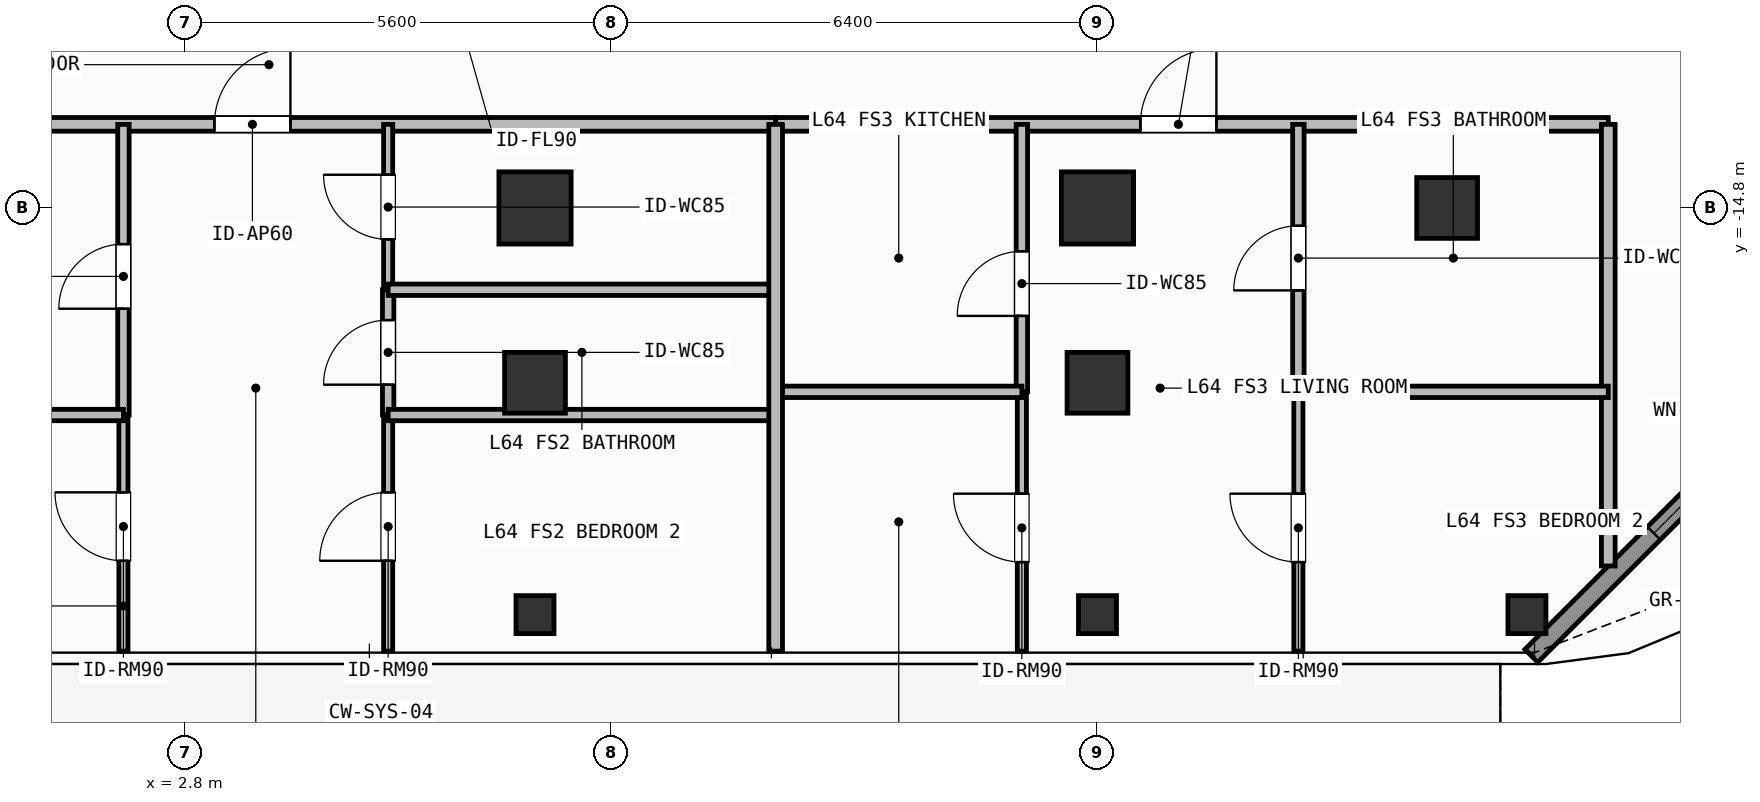
"""IFC4 building model, lengths in metres.
Left out: names, types, materials, properties, quantities, classifications, styles, units other than length and angle.
Written with IfcOpenShell. Run it as: python <this file> out.ifc"""

import sys

from ifc_helpers import new_model, si_unit, direction, frame, frame_2d, origin, origin_2d, place, context, subcontext, project, spatial, rectangle, hollow_rectangle, extrude, element, fill, save


model = new_model("IFC4")
c1 = context("Model", 3, precision=1e-05, world=origin(), true_north=direction((0.0, 1.0)))
c2 = subcontext(c1, "Body", "Model", "MODEL_VIEW")
j1 = project(units=[si_unit("LENGTHUNIT", "METRE"), si_unit("PLANEANGLEUNIT", "RADIAN")], contexts=[c1])
p1 = place(None, origin())
s1 = spatial("IfcSite", under=j1, at=p1, CompositionType="ELEMENT")
p2 = place(p1, origin())
s2 = spatial("IfcBuilding", under=s1, at=p2, CompositionType="ELEMENT")
p3 = place(p2, frame((0.0, 0.0, 262.5)))
s3 = spatial("IfcBuildingStorey", under=s2, at=p3, CompositionType="ELEMENT", Elevation=262.5)
for number, where, z_axis, x_axis in (
    (1, (7.4, -14.8, 0.0), (0.0, 0.0, 1.0), (1.0, 0.0, 0.0)),
    (2, (14.8, -14.8, 0.0), (0.0, 0.0, 1.0), (1.0, 0.0, 0.0)),
):
    element("IfcColumn", number, at=place(p3, frame(where, z_axis=z_axis, x_axis=x_axis)), inside=s3, PredefinedType="COLUMN", context=c2, shape_type="SweptSolid", body=[
        extrude(rectangle(XDim=0.95, YDim=0.95, at=origin_2d()), origin(), (0.0, 0.0, 1.0), 3.9),
    ])
for number, where, z_axis, x_axis in (
    (3, (19.4, -14.8, 0.0), (0.0, 0.0, 1.0), (1.0, 0.0, 0.0)),
    (4, (7.4, -17.1, 0.0), (0.0, 0.0, 1.0), (1.0, 0.0, 0.0)),
    (5, (14.8, -17.1, 0.0), (0.0, 0.0, 1.0), (1.0, 0.0, 0.0)),
):
    element("IfcColumn", number, at=place(p3, frame(where, z_axis=z_axis, x_axis=x_axis)), inside=s3, PredefinedType="COLUMN", context=c2, shape_type="SweptSolid", body=[
        extrude(hollow_rectangle(XDim=0.8, YDim=0.8, WallThickness=0.036, at=origin_2d()), origin(), (0.0, 0.0, 1.0), 3.9),
    ])
for number, where, z_axis, x_axis in (
    (6, (20.45, -20.15, 0.0), (0.0, 0.0, 1.0), (1.0, 0.0, 0.0)),
    (7, (7.4, -20.15, 0.0), (0.0, 0.0, 1.0), (1.0, 0.0, 0.0)),
    (8, (14.8, -20.15, 0.0), (0.0, 0.0, 1.0), (1.0, 0.0, 0.0)),
):
    element("IfcColumn", number, at=place(p3, frame(where, z_axis=z_axis, x_axis=x_axis)), inside=s3, PredefinedType="COLUMN", context=c2, shape_type="SweptSolid", body=[
        extrude(hollow_rectangle(XDim=0.5, YDim=0.5, WallThickness=0.025, at=origin_2d()), origin(), (0.0, 0.0, 1.0), 3.9),
    ])
p4 = place(p3, frame((24.792, -16.408, 0.0), z_axis=(0.0, 0.0, 1.0), x_axis=(-0.707126925818, -0.707086635981, 0.0)))
e9 = element("IfcWall", 9, at=p4, inside=s3, PredefinedType="SOLIDWALL", context=c2, shape_type="SweptSolid", body=[
    extrude(rectangle(XDim=6.06, YDim=0.24, at=frame_2d((3.03, 0.0))), origin(), (0.0, 0.0, 1.0), 3.68),
])
p5 = place(p4, frame((2.28, 0.0, 0.8)))
e10 = element("IfcOpeningElement", 10, at=p5, cuts=e9, PredefinedType="OPENING", context=c2, shape_type="SweptSolid", body=[
    extrude(rectangle(XDim=1.5, YDim=1.85, at=frame_2d((0.75, 0.925))), frame((0.0, 0.13, 0.0), z_axis=(0.0, -1.0, 0.0), x_axis=(1.0, 0.0, 0.0)), (0.0, 0.0, 1.0), 0.26),
])
p6 = place(p3, frame((-3.735, -13.7, 0.0), z_axis=(0.0, 0.0, 1.0), x_axis=(1.0, 0.0, 0.0)))
e11 = element("IfcWall", 11, at=p6, inside=s3, PredefinedType="PARTITIONING", context=c2, shape_type="SweptSolid", body=[
    extrude(rectangle(XDim=14.301, YDim=0.18, at=frame_2d((7.15, 0.0))), origin(), (0.0, 0.0, 1.0), 3.68),
])
p7 = place(p6, frame((6.917, 0.0, 0.0)))
e12 = element("IfcOpeningElement", 12, at=p7, cuts=e11, PredefinedType="OPENING", context=c2, shape_type="SweptSolid", body=[
    extrude(rectangle(XDim=1.0, YDim=2.2, at=frame_2d((0.5, 1.1))), frame((0.0, 0.1, 0.0), z_axis=(0.0, -1.0, 0.0), x_axis=(1.0, 0.0, 0.0)), (0.0, 0.0, 1.0), 0.2),
])
p8 = place(p3, frame((1.985, -17.524, 0.0), z_axis=(0.0, 0.0, 1.0), x_axis=(0.0, 1.0, 0.0)))
e13 = element("IfcWall", 13, at=p8, inside=s3, PredefinedType="PARTITIONING", context=c2, shape_type="SweptSolid", body=[
    extrude(rectangle(XDim=3.824, YDim=0.15, at=frame_2d((1.912, 0.0))), origin(), (0.0, 0.0, 1.0), 3.68),
])
p9 = place(p8, frame((1.398, 0.0, 0.0)))
e14 = element("IfcOpeningElement", 14, at=p9, cuts=e13, PredefinedType="OPENING", context=c2, shape_type="SweptSolid", body=[
    extrude(rectangle(XDim=0.85, YDim=2.1, at=frame_2d((0.425, 1.05))), frame((0.0, 0.085, 0.0), z_axis=(0.0, -1.0, 0.0), x_axis=(1.0, 0.0, 0.0)), (0.0, 0.0, 1.0), 0.17),
])
p10 = place(p3, frame((1.985, -20.63, 0.0), z_axis=(0.0, 0.0, 1.0), x_axis=(0.0, 1.0, 0.0)))
e15 = element("IfcWall", 15, at=p10, inside=s3, PredefinedType="PARTITIONING", context=c2, shape_type="SweptSolid", body=[
    extrude(rectangle(XDim=3.106, YDim=0.12, at=frame_2d((1.553, 0.0))), origin(), (0.0, 0.0, 1.0), 3.68),
])
p11 = place(p10, frame((1.189, 0.0, 0.0)))
e16 = element("IfcOpeningElement", 16, at=p11, cuts=e15, PredefinedType="OPENING", context=c2, shape_type="SweptSolid", body=[
    extrude(rectangle(XDim=0.9, YDim=2.1, at=frame_2d((0.45, 1.05))), frame((0.0, 0.07, 0.0), z_axis=(0.0, -1.0, 0.0), x_axis=(1.0, 0.0, 0.0)), (0.0, 0.0, 1.0), 0.14),
])
p12 = place(p3, frame((5.468, -17.524, 0.0), z_axis=(0.0, 0.0, 1.0), x_axis=(0.0, 1.0, 0.0)))
e17 = element("IfcWall", 17, at=p12, inside=s3, PredefinedType="PARTITIONING", context=c2, shape_type="SweptSolid", body=[
    extrude(rectangle(XDim=1.648, YDim=0.15, at=frame_2d((0.824, 0.0))), origin(), (0.0, 0.0, 1.0), 3.68),
])
p13 = place(p12, frame((0.399, 0.0, 0.0)))
e18 = element("IfcOpeningElement", 18, at=p13, cuts=e17, PredefinedType="OPENING", context=c2, shape_type="SweptSolid", body=[
    extrude(rectangle(XDim=0.85, YDim=2.1, at=frame_2d((0.425, 1.05))), frame((0.0, 0.085, 0.0), z_axis=(0.0, -1.0, 0.0), x_axis=(1.0, 0.0, 0.0)), (0.0, 0.0, 1.0), 0.17),
])
p14 = place(p3, frame((5.468, -15.876, 0.0), z_axis=(0.0, 0.0, 1.0), x_axis=(0.0, 1.0, 0.0)))
e19 = element("IfcWall", 19, at=p14, inside=s3, PredefinedType="PARTITIONING", context=c2, shape_type="SweptSolid", body=[
    extrude(rectangle(XDim=2.176, YDim=0.12, at=frame_2d((1.088, 0.0))), origin(), (0.0, 0.0, 1.0), 3.68),
])
p15 = place(p14, frame((0.663, 0.0, 0.0)))
e20 = element("IfcOpeningElement", 20, at=p15, cuts=e19, PredefinedType="OPENING", context=c2, shape_type="SweptSolid", body=[
    extrude(rectangle(XDim=0.85, YDim=2.1, at=frame_2d((0.425, 1.05))), frame((0.0, 0.07, 0.0), z_axis=(0.0, -1.0, 0.0), x_axis=(1.0, 0.0, 0.0)), (0.0, 0.0, 1.0), 0.14),
])
p16 = place(p3, frame((5.468, -20.63, 0.0), z_axis=(0.0, 0.0, 1.0), x_axis=(0.0, 1.0, 0.0)))
e21 = element("IfcWall", 21, at=p16, inside=s3, PredefinedType="PARTITIONING", context=c2, shape_type="SweptSolid", body=[
    extrude(rectangle(XDim=3.106, YDim=0.12, at=frame_2d((1.553, 0.0))), origin(), (0.0, 0.0, 1.0), 3.68),
])
p17 = place(p16, frame((1.189, 0.0, 0.0)))
e22 = element("IfcOpeningElement", 22, at=p17, cuts=e21, PredefinedType="OPENING", context=c2, shape_type="SweptSolid", body=[
    extrude(rectangle(XDim=0.9, YDim=2.1, at=frame_2d((0.45, 1.05))), frame((0.0, 0.07, 0.0), z_axis=(0.0, -1.0, 0.0), x_axis=(1.0, 0.0, 0.0)), (0.0, 0.0, 1.0), 0.14),
])
p18 = place(p3, frame((10.566, -13.7, 0.0), z_axis=(0.0, 0.0, 1.0), x_axis=(1.0, 0.0, 0.0)))
e23 = element("IfcWall", 23, at=p18, inside=s3, PredefinedType="PARTITIONING", context=c2, shape_type="SweptSolid", body=[
    extrude(rectangle(XDim=10.954, YDim=0.18, at=frame_2d((5.477, 0.0))), origin(), (0.0, 0.0, 1.0), 3.68),
])
p19 = place(p18, frame((4.799, 0.0, 0.0)))
e24 = element("IfcOpeningElement", 24, at=p19, cuts=e23, PredefinedType="OPENING", context=c2, shape_type="SweptSolid", body=[
    extrude(rectangle(XDim=1.0, YDim=2.2, at=frame_2d((0.5, 1.1))), frame((0.0, 0.1, 0.0), z_axis=(0.0, -1.0, 0.0), x_axis=(1.0, 0.0, 0.0)), (0.0, 0.0, 1.0), 0.2),
])
p20 = place(p3, frame((13.805, -17.219, 0.0), z_axis=(0.0, 0.0, 1.0), x_axis=(0.0, 1.0, 0.0)))
e25 = element("IfcWall", 25, at=p20, inside=s3, PredefinedType="PARTITIONING", context=c2, shape_type="SweptSolid", body=[
    extrude(rectangle(XDim=3.519, YDim=0.15, at=frame_2d((1.76, 0.0))), origin(), (0.0, 0.0, 1.0), 3.68),
])
p21 = place(p20, frame((0.999, 0.0, 0.0)))
e26 = element("IfcOpeningElement", 26, at=p21, cuts=e25, PredefinedType="OPENING", context=c2, shape_type="SweptSolid", body=[
    extrude(rectangle(XDim=0.85, YDim=2.1, at=frame_2d((0.425, 1.05))), frame((0.0, 0.085, 0.0), z_axis=(0.0, -1.0, 0.0), x_axis=(1.0, 0.0, 0.0)), (0.0, 0.0, 1.0), 0.17),
])
p22 = place(p3, frame((13.805, -20.63, 0.0), z_axis=(0.0, 0.0, 1.0), x_axis=(0.0, 1.0, 0.0)))
e27 = element("IfcWall", 27, at=p22, inside=s3, PredefinedType="PARTITIONING", context=c2, shape_type="SweptSolid", body=[
    extrude(rectangle(XDim=3.411, YDim=0.12, at=frame_2d((1.706, 0.0))), origin(), (0.0, 0.0, 1.0), 3.68),
])
p23 = place(p22, frame((1.171, 0.0, 0.0)))
e28 = element("IfcOpeningElement", 28, at=p23, cuts=e27, PredefinedType="OPENING", context=c2, shape_type="SweptSolid", body=[
    extrude(rectangle(XDim=0.9, YDim=2.1, at=frame_2d((0.45, 1.05))), frame((0.0, 0.07, 0.0), z_axis=(0.0, -1.0, 0.0), x_axis=(1.0, 0.0, 0.0)), (0.0, 0.0, 1.0), 0.14),
])
p24 = place(p3, frame((17.443, -17.219, 0.0), z_axis=(0.0, 0.0, 1.0), x_axis=(0.0, 1.0, 0.0)))
e29 = element("IfcWall", 29, at=p24, inside=s3, PredefinedType="PARTITIONING", context=c2, shape_type="SweptSolid", body=[
    extrude(rectangle(XDim=3.519, YDim=0.15, at=frame_2d((1.76, 0.0))), origin(), (0.0, 0.0, 1.0), 3.68),
])
p25 = place(p24, frame((1.334, 0.0, 0.0)))
e30 = element("IfcOpeningElement", 30, at=p25, cuts=e29, PredefinedType="OPENING", context=c2, shape_type="SweptSolid", body=[
    extrude(rectangle(XDim=0.85, YDim=2.1, at=frame_2d((0.425, 1.05))), frame((0.0, 0.085, 0.0), z_axis=(0.0, -1.0, 0.0), x_axis=(1.0, 0.0, 0.0)), (0.0, 0.0, 1.0), 0.17),
])
p26 = place(p3, frame((17.443, -20.63, 0.0), z_axis=(0.0, 0.0, 1.0), x_axis=(0.0, 1.0, 0.0)))
e31 = element("IfcWall", 31, at=p26, inside=s3, PredefinedType="PARTITIONING", context=c2, shape_type="SweptSolid", body=[
    extrude(rectangle(XDim=3.411, YDim=0.12, at=frame_2d((1.706, 0.0))), origin(), (0.0, 0.0, 1.0), 3.68),
])
p27 = place(p26, frame((1.171, 0.0, 0.0)))
e32 = element("IfcOpeningElement", 32, at=p27, cuts=e31, PredefinedType="OPENING", context=c2, shape_type="SweptSolid", body=[
    extrude(rectangle(XDim=0.9, YDim=2.1, at=frame_2d((0.45, 1.05))), frame((0.0, 0.07, 0.0), z_axis=(0.0, -1.0, 0.0), x_axis=(1.0, 0.0, 0.0)), (0.0, 0.0, 1.0), 0.14),
])
p28 = place(p3, frame((21.52, -19.51, 0.0), z_axis=(0.0, 0.0, 1.0), x_axis=(0.0, 1.0, 0.0)))
e33 = element("IfcWall", 33, at=p28, inside=s3, PredefinedType="PARTITIONING", context=c2, shape_type="SweptSolid", body=[
    extrude(rectangle(XDim=5.81, YDim=0.18, at=frame_2d((2.905, 0.0))), origin(), (0.0, 0.0, 1.0), 3.68),
])
p29 = place(p3, frame((-3.735, -17.524, 0.0), z_axis=(0.0, 0.0, 1.0), x_axis=(1.0, 0.0, 0.0)))
e34 = element("IfcWall", 34, at=p29, inside=s3, PredefinedType="PARTITIONING", context=c2, shape_type="SweptSolid", body=[
    extrude(rectangle(XDim=5.72, YDim=0.15, at=frame_2d((2.86, 0.0))), origin(), (0.0, 0.0, 1.0), 3.68),
])
for number, where, z_axis, x_axis in (
    (35, (5.468, -15.876, 0.0), (0.0, 0.0, 1.0), (1.0, 0.0, 0.0)),
    (36, (5.468, -17.524, 0.0), (0.0, 0.0, 1.0), (1.0, 0.0, 0.0)),
):
    element("IfcWall", number, at=place(p3, frame(where, z_axis=z_axis, x_axis=x_axis)), inside=s3, PredefinedType="PARTITIONING", context=c2, shape_type="SweptSolid", body=[
        extrude(rectangle(XDim=5.098, YDim=0.15, at=frame_2d((2.549, 0.0))), origin(), (0.0, 0.0, 1.0), 3.68),
    ])
p30 = place(p3, frame((10.566, -17.219, 0.0), z_axis=(0.0, 0.0, 1.0), x_axis=(1.0, 0.0, 0.0)))
e37 = element("IfcWall", 37, at=p30, inside=s3, PredefinedType="PARTITIONING", context=c2, shape_type="SweptSolid", body=[
    extrude(rectangle(XDim=3.239, YDim=0.15, at=frame_2d((1.62, 0.0))), origin(), (0.0, 0.0, 1.0), 3.182),
])
p31 = place(p3, frame((17.443, -17.219, 0.0), z_axis=(0.0, 0.0, 1.0), x_axis=(1.0, 0.0, 0.0)))
e38 = element("IfcWall", 38, at=p31, inside=s3, PredefinedType="PARTITIONING", context=c2, shape_type="SweptSolid", body=[
    extrude(rectangle(XDim=4.077, YDim=0.15, at=frame_2d((2.039, 0.0))), origin(), (0.0, 0.0, 1.0), 3.68),
])
p32 = place(p3, frame((10.566, -20.63, 0.0), z_axis=(0.0, 0.0, 1.0), x_axis=(0.0, 1.0, 0.0)))
e39 = element("IfcWall", 39, at=p32, inside=s3, PredefinedType="PARTITIONING", context=c2, shape_type="SweptSolid", body=[
    extrude(rectangle(XDim=6.93, YDim=0.18, at=frame_2d((3.465, 0.0))), origin(), (0.0, 0.0, 1.0), 3.68),
])
p33 = place(p5, origin())
e40 = element("IfcWindow", 40, at=p33, inside=s3, PartitioningType="SINGLE_PANEL", PredefinedType="WINDOW", context=c2, shape_type="SweptSolid", body=[
    extrude(rectangle(XDim=1.5, YDim=1.85, at=frame_2d((0.75, 0.925))), frame((0.0, 0.03, 0.0), z_axis=(0.0, -1.0, 0.0), x_axis=(1.0, 0.0, 0.0)), (0.0, 0.0, 1.0), 0.06),
])
fill(e10, e40)
p34 = place(p7, origin())
e41 = element("IfcDoor", 41, at=p34, inside=s3, OperationType="SINGLE_SWING_RIGHT", PredefinedType="DOOR", context=c2, shape_type="SweptSolid", body=[
    extrude(rectangle(XDim=1.0, YDim=2.2, at=frame_2d((0.5, 1.1))), frame((0.0, 0.025, 0.0), z_axis=(0.0, -1.0, 0.0), x_axis=(1.0, 0.0, 0.0)), (0.0, 0.0, 1.0), 0.05),
])
fill(e12, e41)
p35 = place(p9, origin())
e42 = element("IfcDoor", 42, at=p35, inside=s3, OperationType="SINGLE_SWING_LEFT", PredefinedType="DOOR", context=c2, shape_type="SweptSolid", body=[
    extrude(rectangle(XDim=0.85, YDim=2.1, at=frame_2d((0.425, 1.05))), frame((0.0, 0.025, 0.0), z_axis=(0.0, -1.0, 0.0), x_axis=(1.0, 0.0, 0.0)), (0.0, 0.0, 1.0), 0.05),
])
fill(e14, e42)
p36 = place(p11, origin())
e43 = element("IfcDoor", 43, at=p36, inside=s3, OperationType="SINGLE_SWING_RIGHT", PredefinedType="DOOR", context=c2, shape_type="SweptSolid", body=[
    extrude(rectangle(XDim=0.9, YDim=2.1, at=frame_2d((0.45, 1.05))), frame((0.0, 0.025, 0.0), z_axis=(0.0, -1.0, 0.0), x_axis=(1.0, 0.0, 0.0)), (0.0, 0.0, 1.0), 0.05),
])
fill(e16, e43)
p37 = place(p13, origin())
e44 = element("IfcDoor", 44, at=p37, inside=s3, OperationType="SINGLE_SWING_LEFT", PredefinedType="DOOR", context=c2, shape_type="SweptSolid", body=[
    extrude(rectangle(XDim=0.85, YDim=2.1, at=frame_2d((0.425, 1.05))), frame((0.0, 0.025, 0.0), z_axis=(0.0, -1.0, 0.0), x_axis=(1.0, 0.0, 0.0)), (0.0, 0.0, 1.0), 0.05),
])
fill(e18, e44)
p38 = place(p15, origin())
e45 = element("IfcDoor", 45, at=p38, inside=s3, OperationType="SINGLE_SWING_RIGHT", PredefinedType="DOOR", context=c2, shape_type="SweptSolid", body=[
    extrude(rectangle(XDim=0.85, YDim=2.1, at=frame_2d((0.425, 1.05))), frame((0.0, 0.025, 0.0), z_axis=(0.0, -1.0, 0.0), x_axis=(1.0, 0.0, 0.0)), (0.0, 0.0, 1.0), 0.05),
])
fill(e20, e45)
p39 = place(p17, origin())
e46 = element("IfcDoor", 46, at=p39, inside=s3, OperationType="SINGLE_SWING_LEFT", PredefinedType="DOOR", context=c2, shape_type="SweptSolid", body=[
    extrude(rectangle(XDim=0.9, YDim=2.1, at=frame_2d((0.45, 1.05))), frame((0.0, 0.025, 0.0), z_axis=(0.0, -1.0, 0.0), x_axis=(1.0, 0.0, 0.0)), (0.0, 0.0, 1.0), 0.05),
])
fill(e22, e46)
p40 = place(p19, origin())
e47 = element("IfcDoor", 47, at=p40, inside=s3, OperationType="SINGLE_SWING_RIGHT", PredefinedType="DOOR", context=c2, shape_type="SweptSolid", body=[
    extrude(rectangle(XDim=1.0, YDim=2.2, at=frame_2d((0.5, 1.1))), frame((0.0, 0.025, 0.0), z_axis=(0.0, -1.0, 0.0), x_axis=(1.0, 0.0, 0.0)), (0.0, 0.0, 1.0), 0.05),
])
fill(e24, e47)
p41 = place(p21, origin())
e48 = element("IfcDoor", 48, at=p41, inside=s3, OperationType="SINGLE_SWING_LEFT", PredefinedType="DOOR", context=c2, shape_type="SweptSolid", body=[
    extrude(rectangle(XDim=0.85, YDim=2.1, at=frame_2d((0.425, 1.05))), frame((0.0, 0.025, 0.0), z_axis=(0.0, -1.0, 0.0), x_axis=(1.0, 0.0, 0.0)), (0.0, 0.0, 1.0), 0.05),
])
fill(e26, e48)
p42 = place(p23, origin())
e49 = element("IfcDoor", 49, at=p42, inside=s3, OperationType="SINGLE_SWING_RIGHT", PredefinedType="DOOR", context=c2, shape_type="SweptSolid", body=[
    extrude(rectangle(XDim=0.9, YDim=2.1, at=frame_2d((0.45, 1.05))), frame((0.0, 0.025, 0.0), z_axis=(0.0, -1.0, 0.0), x_axis=(1.0, 0.0, 0.0)), (0.0, 0.0, 1.0), 0.05),
])
fill(e28, e49)
p43 = place(p25, origin())
e50 = element("IfcDoor", 50, at=p43, inside=s3, OperationType="SINGLE_SWING_LEFT", PredefinedType="DOOR", context=c2, shape_type="SweptSolid", body=[
    extrude(rectangle(XDim=0.85, YDim=2.1, at=frame_2d((0.425, 1.05))), frame((0.0, 0.025, 0.0), z_axis=(0.0, -1.0, 0.0), x_axis=(1.0, 0.0, 0.0)), (0.0, 0.0, 1.0), 0.05),
])
fill(e30, e50)
p44 = place(p27, origin())
e51 = element("IfcDoor", 51, at=p44, inside=s3, OperationType="SINGLE_SWING_RIGHT", PredefinedType="DOOR", context=c2, shape_type="SweptSolid", body=[
    extrude(rectangle(XDim=0.9, YDim=2.1, at=frame_2d((0.45, 1.05))), frame((0.0, 0.025, 0.0), z_axis=(0.0, -1.0, 0.0), x_axis=(1.0, 0.0, 0.0)), (0.0, 0.0, 1.0), 0.05),
])
fill(e32, e51)
save(model, sys.argv[1])
